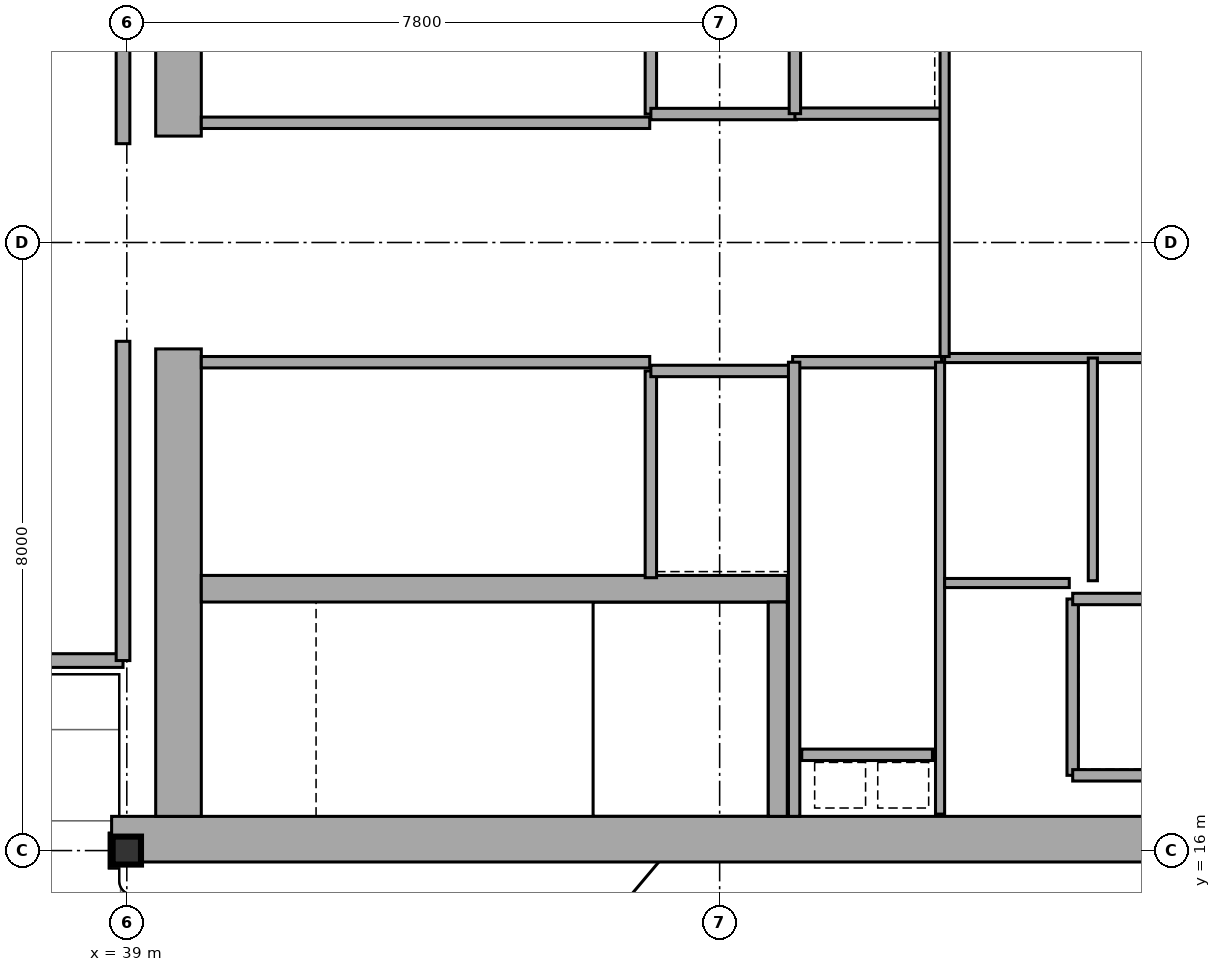
"""IFC4 building model, lengths in metres.
Left out: names, types, materials, properties, quantities, classifications, styles, units other than length and angle.
Written with IfcOpenShell. Run it as: python <this file> out.ifc"""

import sys

from ifc_helpers import new_model, si_unit, direction, frame, frame_2d, origin, origin_2d, place, context, subcontext, project, spatial, rectangle, i_section, extrude, element, fill, save


model = new_model("IFC4")
c1 = context("Model", 3, precision=1e-05, world=origin(), true_north=direction((0.0, 1.0)))
c2 = subcontext(c1, "Body", "Model", "MODEL_VIEW")
j1 = project(units=[si_unit("LENGTHUNIT", "METRE"), si_unit("PLANEANGLEUNIT", "RADIAN")], contexts=[c1])
p1 = place(None, origin())
s1 = spatial("IfcSite", under=j1, at=p1, CompositionType="ELEMENT")
p2 = place(p1, origin())
s2 = spatial("IfcBuilding", under=s1, at=p2, CompositionType="ELEMENT")
p3 = place(p2, frame((0.0, 0.0, 262.05)))
s3 = spatial("IfcBuildingStorey", under=s2, at=p3, CompositionType="ELEMENT", Elevation=262.05)
p4 = place(p3, frame((38.8, 16.15, 0.0), z_axis=(0.0, 0.0, 1.0), x_axis=(1.0, 0.0, 0.0)))
e1 = element("IfcWall", 1, at=p4, inside=s3, PredefinedType="SHEAR", context=c2, shape_type="SweptSolid", body=[
    extrude(rectangle(XDim=16.0, YDim=0.6, at=frame_2d((8.0, 0.0))), origin(), (0.0, 0.0, 1.0), 4.56),
])
for number, where, z_axis, x_axis in (
    (2, (39.68, 16.45, 0.0), (0.0, 0.0, 1.0), (0.0, 1.0, 0.0)),
    (3, (39.68, 25.4, 0.0), (0.0, 0.0, 1.0), (0.0, 1.0, 0.0)),
):
    element("IfcWall", number, at=place(p3, frame(where, z_axis=z_axis, x_axis=x_axis)), inside=s3, PredefinedType="SHEAR", context=c2, shape_type="SweptSolid", body=[
        extrude(rectangle(XDim=6.15, YDim=0.6, at=frame_2d((3.075, 0.0))), origin(), (0.0, 0.0, 1.0), 4.56),
    ])
p5 = place(p3, frame((39.98, 19.445, 0.0), z_axis=(0.0, 0.0, 1.0), x_axis=(1.0, 0.0, 0.0)))
e4 = element("IfcWall", 4, at=p5, inside=s3, PredefinedType="SHEAR", context=c2, shape_type="SweptSolid", body=[
    extrude(rectangle(XDim=7.71, YDim=0.35, at=frame_2d((3.855, 0.0))), origin(), (0.0, 0.0, 1.0), 4.56),
])
p6 = place(p5, frame((0.25, 0.0, 0.0)))
e5 = element("IfcOpeningElement", 5, at=p6, cuts=e4, PredefinedType="OPENING", context=c2, shape_type="SweptSolid", body=[
    extrude(rectangle(XDim=1.1, YDim=2.15, at=frame_2d((0.55, 1.075))), frame((0.0, 0.185, 0.0), z_axis=(0.0, -1.0, 0.0), x_axis=(1.0, 0.0, 0.0)), (0.0, 0.0, 1.0), 0.37),
])
p7 = place(p3, frame((47.565, 16.45, 0.0), z_axis=(0.0, 0.0, 1.0), x_axis=(0.0, 1.0, 0.0)))
e6 = element("IfcWall", 6, at=p7, inside=s3, PredefinedType="SHEAR", context=c2, shape_type="SweptSolid", body=[
    extrude(rectangle(XDim=2.82, YDim=0.25, at=frame_2d((1.41, 0.0))), origin(), (0.0, 0.0, 1.0), 4.56),
])
p8 = place(p3, frame((39.0, 16.0, 0.0), z_axis=(0.0, 0.0, 1.0), x_axis=(1.0, 0.0, 0.0)))
e7 = element("IfcColumn", 7, at=p8, inside=s3, PredefinedType="COLUMN", context=c2, shape_type="SweptSolid", body=[
    extrude(i_section(OverallWidth=0.373, OverallDepth=0.368, WebThickness=0.015, FlangeThickness=0.024, at=origin_2d()), origin(), (0.0, 0.0, 1.0), 4.794),
])
p9 = place(p3, frame((39.98, 25.575, 0.0), z_axis=(0.0, 0.0, 1.0), x_axis=(1.0, 0.0, 0.0)))
e8 = element("IfcWall", 8, at=p9, inside=s3, PredefinedType="PARTITIONING", context=c2, shape_type="SweptSolid", body=[
    extrude(rectangle(XDim=5.9, YDim=0.15, at=frame_2d((2.95, 0.0))), origin(), (0.0, 0.0, 1.0), 4.56),
])
p10 = place(p9, frame((2.35, 0.0, 0.0)))
e9 = element("IfcOpeningElement", 9, at=p10, cuts=e8, PredefinedType="OPENING", context=c2, shape_type="SweptSolid", body=[
    extrude(rectangle(XDim=1.05, YDim=2.15, at=frame_2d((0.525, 1.075))), frame((0.0, 0.085, 0.0), z_axis=(0.0, -1.0, 0.0), x_axis=(1.0, 0.0, 0.0)), (0.0, 0.0, 1.0), 0.17),
])
p11 = place(p3, frame((39.98, 22.425, 0.0), z_axis=(0.0, 0.0, 1.0), x_axis=(1.0, 0.0, 0.0)))
e10 = element("IfcWall", 10, at=p11, inside=s3, PredefinedType="PARTITIONING", context=c2, shape_type="SweptSolid", body=[
    extrude(rectangle(XDim=5.9, YDim=0.15, at=frame_2d((2.95, 0.0))), origin(), (0.0, 0.0, 1.0), 4.56),
])
p12 = place(p11, frame((2.35, 0.0, 0.0)))
e11 = element("IfcOpeningElement", 11, at=p12, cuts=e10, PredefinedType="OPENING", context=c2, shape_type="SweptSolid", body=[
    extrude(rectangle(XDim=1.05, YDim=2.15, at=frame_2d((0.525, 1.075))), frame((0.0, 0.085, 0.0), z_axis=(0.0, -1.0, 0.0), x_axis=(1.0, 0.0, 0.0)), (0.0, 0.0, 1.0), 0.17),
])
p13 = place(p3, frame((45.895, 25.69, 0.0), z_axis=(0.0, 0.0, 1.0), x_axis=(0.0, 1.0, 0.0)))
e12 = element("IfcWall", 12, at=p13, inside=s3, PredefinedType="PARTITIONING", context=c2, shape_type="SweptSolid", body=[
    extrude(rectangle(XDim=2.72, YDim=0.15, at=frame_2d((1.36, 0.0))), origin(), (0.0, 0.0, 1.0), 4.56),
])
p14 = place(p13, frame((0.81, 0.0, 0.0)))
e13 = element("IfcOpeningElement", 13, at=p14, cuts=e12, PredefinedType="OPENING", context=c2, shape_type="SweptSolid", body=[
    extrude(rectangle(XDim=1.1, YDim=2.15, at=frame_2d((0.55, 1.075))), frame((0.0, 0.085, 0.0), z_axis=(0.0, -1.0, 0.0), x_axis=(1.0, 0.0, 0.0)), (0.0, 0.0, 1.0), 0.17),
])
p15 = place(p3, frame((45.895, 25.69, 0.0), z_axis=(0.0, 0.0, 1.0), x_axis=(1.0, 0.0, 0.0)))
e14 = element("IfcWall", 14, at=p15, inside=s3, PredefinedType="PARTITIONING", context=c2, shape_type="SweptSolid", body=[
    extrude(rectangle(XDim=1.915, YDim=0.15, at=frame_2d((0.958, 0.0))), origin(), (0.0, 0.0, 1.0), 4.56),
])
p16 = place(p3, frame((45.895, 19.59, 0.0), z_axis=(0.0, 0.0, 1.0), x_axis=(0.0, 1.0, 0.0)))
e15 = element("IfcWall", 15, at=p16, inside=s3, PredefinedType="PARTITIONING", context=c2, shape_type="SweptSolid", body=[
    extrude(rectangle(XDim=2.72, YDim=0.15, at=frame_2d((1.36, 0.0))), origin(), (0.0, 0.0, 1.0), 4.56),
])
p17 = place(p16, frame((0.81, 0.0, 0.0)))
e16 = element("IfcOpeningElement", 16, at=p17, cuts=e15, PredefinedType="OPENING", context=c2, shape_type="SweptSolid", body=[
    extrude(rectangle(XDim=1.1, YDim=2.15, at=frame_2d((0.55, 1.075))), frame((0.0, 0.085, 0.0), z_axis=(0.0, -1.0, 0.0), x_axis=(1.0, 0.0, 0.0)), (0.0, 0.0, 1.0), 0.17),
])
p18 = place(p3, frame((45.895, 22.31, 0.0), z_axis=(0.0, 0.0, 1.0), x_axis=(1.0, 0.0, 0.0)))
e17 = element("IfcWall", 17, at=p18, inside=s3, PredefinedType="PARTITIONING", context=c2, shape_type="SweptSolid", body=[
    extrude(rectangle(XDim=1.915, YDim=0.15, at=frame_2d((0.958, 0.0))), origin(), (0.0, 0.0, 1.0), 4.56),
])
p19 = place(p3, frame((47.79, 25.695, 0.0), z_axis=(0.0, 0.0, 1.0), x_axis=(1.0, 0.0, 0.0)))
e18 = element("IfcWall", 18, at=p19, inside=s3, PredefinedType="PARTITIONING", context=c2, shape_type="SweptSolid", body=[
    extrude(rectangle(XDim=1.92, YDim=0.15, at=frame_2d((0.96, 0.0))), origin(), (0.0, 0.0, 1.0), 4.56),
])
p20 = place(p19, frame((0.41, 0.0, 0.0)))
e19 = element("IfcOpeningElement", 19, at=p20, cuts=e18, PredefinedType="OPENING", context=c2, shape_type="SweptSolid", body=[
    extrude(rectangle(XDim=1.1, YDim=2.15, at=frame_2d((0.55, 1.075))), frame((0.0, 0.085, 0.0), z_axis=(0.0, -1.0, 0.0), x_axis=(1.0, 0.0, 0.0)), (0.0, 0.0, 1.0), 0.17),
])
p21 = place(p3, frame((47.79, 25.695, 0.0), z_axis=(0.0, 0.0, 1.0), x_axis=(0.0, 1.0, 0.0)))
e20 = element("IfcWall", 20, at=p21, inside=s3, PredefinedType="PARTITIONING", context=c2, shape_type="SweptSolid", body=[
    extrude(rectangle(XDim=2.415, YDim=0.15, at=frame_2d((1.208, 0.0))), origin(), (0.0, 0.0, 1.0), 4.56),
])
p22 = place(p3, frame((51.445, 16.99, 0.0), z_axis=(0.0, 0.0, 1.0), x_axis=(0.0, 1.0, 0.0)))
e21 = element("IfcWall", 21, at=p22, inside=s3, PredefinedType="PARTITIONING", context=c2, shape_type="SweptSolid", body=[
    extrude(rectangle(XDim=2.32, YDim=0.15, at=frame_2d((1.16, 0.0))), origin(), (0.0, 0.0, 1.0), 4.56),
])
p23 = place(p22, frame((0.61, 0.0, 0.0)))
e22 = element("IfcOpeningElement", 22, at=p23, cuts=e21, PredefinedType="OPENING", context=c2, shape_type="SweptSolid", body=[
    extrude(rectangle(XDim=1.1, YDim=2.15, at=frame_2d((0.55, 1.075))), frame((0.0, 0.085, 0.0), z_axis=(0.0, -1.0, 0.0), x_axis=(1.0, 0.0, 0.0)), (0.0, 0.0, 1.0), 0.17),
])
for number, where, z_axis, x_axis in (
    (23, (51.445, 16.99, 0.0), (0.0, 0.0, 1.0), (1.0, 0.0, 0.0)),
    (24, (51.445, 19.31, 0.0), (0.0, 0.0, 1.0), (1.0, 0.0, 0.0)),
):
    element("IfcWall", number, at=place(p3, frame(where, z_axis=z_axis, x_axis=x_axis)), inside=s3, PredefinedType="PARTITIONING", context=c2, shape_type="SweptSolid", body=[
        extrude(rectangle(XDim=2.015, YDim=0.15, at=frame_2d((1.007, 0.0))), origin(), (0.0, 0.0, 1.0), 4.56),
    ])
p24 = place(p3, frame((47.88, 17.26, 0.0), z_axis=(0.0, 0.0, 1.0), x_axis=(1.0, 0.0, 0.0)))
e25 = element("IfcWall", 25, at=p24, inside=s3, PredefinedType="PARTITIONING", context=c2, shape_type="SweptSolid", body=[
    extrude(rectangle(XDim=1.72, YDim=0.15, at=frame_2d((0.86, 0.0))), origin(), (0.0, 0.0, 1.0), 4.56),
])
p25 = place(p24, frame((0.42, 0.0, 0.0)))
e26 = element("IfcOpeningElement", 26, at=p25, cuts=e25, PredefinedType="OPENING", context=c2, shape_type="SweptSolid", body=[
    extrude(rectangle(XDim=0.85, YDim=2.15, at=frame_2d((0.425, 1.075))), frame((0.0, 0.085, 0.0), z_axis=(0.0, -1.0, 0.0), x_axis=(1.0, 0.0, 0.0)), (0.0, 0.0, 1.0), 0.17),
])
p26 = place(p3, frame((47.76, 22.425, 0.0), z_axis=(0.0, 0.0, 1.0), x_axis=(1.0, 0.0, 0.0)))
e27 = element("IfcWall", 27, at=p26, inside=s3, PredefinedType="PARTITIONING", context=c2, shape_type="SweptSolid", body=[
    extrude(rectangle(XDim=1.96, YDim=0.15, at=frame_2d((0.98, 0.0))), origin(), (0.0, 0.0, 1.0), 4.56),
])
p27 = place(p3, frame((47.78, 16.45, 0.0), z_axis=(0.0, 0.0, 1.0), x_axis=(0.0, 1.0, 0.0)))
e28 = element("IfcWall", 28, at=p27, inside=s3, PredefinedType="PARTITIONING", context=c2, shape_type="SweptSolid", body=[
    extrude(rectangle(XDim=5.975, YDim=0.15, at=frame_2d((2.988, 0.0))), origin(), (0.0, 0.0, 1.0), 4.56),
])
p28 = place(p3, frame((49.7, 16.48, 0.0), z_axis=(0.0, 0.0, 1.0), x_axis=(0.0, 1.0, 0.0)))
e29 = element("IfcWall", 29, at=p28, inside=s3, PredefinedType="PARTITIONING", context=c2, shape_type="SweptSolid", body=[
    extrude(rectangle(XDim=5.945, YDim=0.12, at=frame_2d((2.973, 0.0))), origin(), (0.0, 0.0, 1.0), 4.56),
])
p29 = place(p28, frame((3.35, 0.0, 0.0)))
e30 = element("IfcOpeningElement", 30, at=p29, cuts=e29, PredefinedType="OPENING", context=c2, shape_type="SweptSolid", body=[
    extrude(rectangle(XDim=0.95, YDim=2.15, at=frame_2d((0.475, 1.075))), frame((0.0, 0.07, 0.0), z_axis=(0.0, -1.0, 0.0), x_axis=(1.0, 0.0, 0.0)), (0.0, 0.0, 1.0), 0.14),
])
p30 = place(p3, frame((49.76, 22.48, 0.0), z_axis=(0.0, 0.0, 1.0), x_axis=(1.0, 0.0, 0.0)))
e31 = element("IfcWall", 31, at=p30, inside=s3, PredefinedType="PARTITIONING", context=c2, shape_type="SweptSolid", body=[
    extrude(rectangle(XDim=3.9, YDim=0.12, at=frame_2d((1.95, 0.0))), origin(), (0.0, 0.0, 1.0), 4.56),
])
p31 = place(p30, frame((0.42, 0.0, 0.0)))
e32 = element("IfcOpeningElement", 32, at=p31, cuts=e31, PredefinedType="OPENING", context=c2, shape_type="SweptSolid", body=[
    extrude(rectangle(XDim=0.85, YDim=2.15, at=frame_2d((0.425, 1.075))), frame((0.0, 0.07, 0.0), z_axis=(0.0, -1.0, 0.0), x_axis=(1.0, 0.0, 0.0)), (0.0, 0.0, 1.0), 0.14),
])
p32 = place(p3, frame((51.71, 19.55, 0.0), z_axis=(0.0, 0.0, 1.0), x_axis=(0.0, 1.0, 0.0)))
e33 = element("IfcWall", 33, at=p32, inside=s3, PredefinedType="PARTITIONING", context=c2, shape_type="SweptSolid", body=[
    extrude(rectangle(XDim=2.93, YDim=0.12, at=frame_2d((1.465, 0.0))), origin(), (0.0, 0.0, 1.0), 4.56),
])
p33 = place(p32, frame((0.95, 0.0, 0.0)))
e34 = element("IfcOpeningElement", 34, at=p33, cuts=e33, PredefinedType="OPENING", context=c2, shape_type="SweptSolid", body=[
    extrude(rectangle(XDim=0.85, YDim=2.15, at=frame_2d((0.425, 1.075))), frame((0.0, 0.07, 0.0), z_axis=(0.0, -1.0, 0.0), x_axis=(1.0, 0.0, 0.0)), (0.0, 0.0, 1.0), 0.14),
])
p34 = place(p3, frame((49.76, 19.52, 0.0), z_axis=(0.0, 0.0, 1.0), x_axis=(1.0, 0.0, 0.0)))
e35 = element("IfcWall", 35, at=p34, inside=s3, PredefinedType="PARTITIONING", context=c2, shape_type="SweptSolid", body=[
    extrude(rectangle(XDim=1.64, YDim=0.12, at=frame_2d((0.82, 0.0))), origin(), (0.0, 0.0, 1.0), 4.56),
])
p35 = place(p3, frame((49.76, 22.5, 0.0), z_axis=(0.0, 0.0, 1.0), x_axis=(0.0, 1.0, 0.0)))
e36 = element("IfcWall", 36, at=p35, inside=s3, PredefinedType="PARTITIONING", context=c2, shape_type="SweptSolid", body=[
    extrude(rectangle(XDim=5.72, YDim=0.12, at=frame_2d((2.86, 0.0))), origin(), (0.0, 0.0, 1.0), 4.56),
])
p36 = place(p35, frame((0.95, 0.0, 0.0)))
e37 = element("IfcOpeningElement", 37, at=p36, cuts=e36, PredefinedType="OPENING", context=c2, shape_type="SweptSolid", body=[
    extrude(rectangle(XDim=0.95, YDim=2.15, at=frame_2d((0.475, 1.075))), frame((0.0, 0.07, 0.0), z_axis=(0.0, -1.0, 0.0), x_axis=(1.0, 0.0, 0.0)), (0.0, 0.0, 1.0), 0.14),
])
p37 = place(p3, frame((27.204, 18.5, 0.0), z_axis=(0.0, 0.0, 1.0), x_axis=(1.0, 0.0, 0.0)))
e38 = element("IfcWall", 38, at=p37, inside=s3, PredefinedType="SOLIDWALL", context=c2, shape_type="SweptSolid", body=[
    extrude(rectangle(XDim=11.746, YDim=0.18, at=frame_2d((5.873, 0.0))), origin(), (0.0, 0.0, 1.0), 4.02),
])
p38 = place(p37, frame((5.373, 0.0, 0.0)))
e39 = element("IfcOpeningElement", 39, at=p38, cuts=e38, PredefinedType="OPENING", context=c2, shape_type="SweptSolid", body=[
    extrude(rectangle(XDim=1.0, YDim=2.15, at=frame_2d((0.5, 1.075))), frame((0.0, 0.1, 0.0), z_axis=(0.0, -1.0, 0.0), x_axis=(1.0, 0.0, 0.0)), (0.0, 0.0, 1.0), 0.2),
])
for number, where, z_axis, x_axis in (
    (40, (38.95, 18.5, 0.0), (0.0, 0.0, 1.0), (0.0, 1.0, 0.0)),
    (41, (38.95, 25.3, 0.0), (0.0, 0.0, 1.0), (0.0, 1.0, 0.0)),
):
    element("IfcWall", number, at=place(p3, frame(where, z_axis=z_axis, x_axis=x_axis)), inside=s3, PredefinedType="SOLIDWALL", context=c2, shape_type="SweptSolid", body=[
        extrude(rectangle(XDim=4.2, YDim=0.18, at=frame_2d((2.1, 0.0))), origin(), (0.0, 0.0, 1.0), 4.29),
    ])
p39 = place(p10, origin())
e42 = element("IfcDoor", 42, at=p39, inside=s3, OperationType="SINGLE_SWING_LEFT", PredefinedType="DOOR", context=c2, shape_type="SweptSolid", body=[
    extrude(rectangle(XDim=1.05, YDim=2.15, at=frame_2d((0.525, 1.075))), frame((0.0, 0.025, 0.0), z_axis=(0.0, -1.0, 0.0), x_axis=(1.0, 0.0, 0.0)), (0.0, 0.0, 1.0), 0.05),
])
fill(e9, e42)
p40 = place(p12, frame((1.05, 0.0, 0.0), z_axis=(0.0, 0.0, 1.0), x_axis=(-1.0, 0.0, 0.0)))
e43 = element("IfcDoor", 43, at=p40, inside=s3, OperationType="SINGLE_SWING_RIGHT", PredefinedType="DOOR", context=c2, shape_type="SweptSolid", body=[
    extrude(rectangle(XDim=1.05, YDim=2.15, at=frame_2d((0.525, 1.075))), frame((0.0, 0.025, 0.0), z_axis=(0.0, -1.0, 0.0), x_axis=(1.0, 0.0, 0.0)), (0.0, 0.0, 1.0), 0.05),
])
fill(e11, e43)
p41 = place(p17, frame((1.1, 0.0, 0.0), z_axis=(0.0, 0.0, 1.0), x_axis=(-1.0, 0.0, 0.0)))
e44 = element("IfcDoor", 44, at=p41, inside=s3, OperationType="DOUBLE_DOOR_SLIDING", PredefinedType="DOOR", context=c2, shape_type="SweptSolid", body=[
    extrude(rectangle(XDim=1.1, YDim=2.15, at=frame_2d((0.55, 1.075))), frame((0.0, 0.025, 0.0), z_axis=(0.0, -1.0, 0.0), x_axis=(1.0, 0.0, 0.0)), (0.0, 0.0, 1.0), 0.05),
])
fill(e16, e44)
p42 = place(p20, frame((1.1, 0.0, 0.0), z_axis=(0.0, 0.0, 1.0), x_axis=(-1.0, 0.0, 0.0)))
e45 = element("IfcDoor", 45, at=p42, inside=s3, OperationType="DOUBLE_DOOR_SLIDING", PredefinedType="DOOR", context=c2, shape_type="SweptSolid", body=[
    extrude(rectangle(XDim=1.1, YDim=2.15, at=frame_2d((0.55, 1.075))), frame((0.0, 0.025, 0.0), z_axis=(0.0, -1.0, 0.0), x_axis=(1.0, 0.0, 0.0)), (0.0, 0.0, 1.0), 0.05),
])
fill(e19, e45)
p43 = place(p23, frame((1.1, 0.0, 0.0), z_axis=(0.0, 0.0, 1.0), x_axis=(-1.0, 0.0, 0.0)))
e46 = element("IfcDoor", 46, at=p43, inside=s3, OperationType="DOUBLE_DOOR_SLIDING", PredefinedType="DOOR", context=c2, shape_type="SweptSolid", body=[
    extrude(rectangle(XDim=1.1, YDim=2.15, at=frame_2d((0.55, 1.075))), frame((0.0, 0.025, 0.0), z_axis=(0.0, -1.0, 0.0), x_axis=(1.0, 0.0, 0.0)), (0.0, 0.0, 1.0), 0.05),
])
fill(e22, e46)
p44 = place(p25, origin())
e47 = element("IfcDoor", 47, at=p44, inside=s3, OperationType="SINGLE_SWING_LEFT", PredefinedType="TRAPDOOR", context=c2, shape_type="SweptSolid", body=[
    extrude(rectangle(XDim=0.85, YDim=2.15, at=frame_2d((0.425, 1.075))), frame((0.0, 0.025, 0.0), z_axis=(0.0, -1.0, 0.0), x_axis=(1.0, 0.0, 0.0)), (0.0, 0.0, 1.0), 0.05),
])
fill(e26, e47)
p45 = place(p29, frame((0.95, 0.0, 0.0), z_axis=(0.0, 0.0, 1.0), x_axis=(-1.0, 0.0, 0.0)))
e48 = element("IfcDoor", 48, at=p45, inside=s3, OperationType="SINGLE_SWING_LEFT", PredefinedType="DOOR", context=c2, shape_type="SweptSolid", body=[
    extrude(rectangle(XDim=0.95, YDim=2.15, at=frame_2d((0.475, 1.075))), frame((0.0, 0.025, 0.0), z_axis=(0.0, -1.0, 0.0), x_axis=(1.0, 0.0, 0.0)), (0.0, 0.0, 1.0), 0.05),
])
fill(e30, e48)
p46 = place(p31, frame((0.85, 0.0, 0.0), z_axis=(0.0, 0.0, 1.0), x_axis=(-1.0, 0.0, 0.0)))
e49 = element("IfcDoor", 49, at=p46, inside=s3, OperationType="SINGLE_SWING_LEFT", PredefinedType="DOOR", context=c2, shape_type="SweptSolid", body=[
    extrude(rectangle(XDim=0.85, YDim=2.15, at=frame_2d((0.425, 1.075))), frame((0.0, 0.025, 0.0), z_axis=(0.0, -1.0, 0.0), x_axis=(1.0, 0.0, 0.0)), (0.0, 0.0, 1.0), 0.05),
])
fill(e32, e49)
p47 = place(p33, origin())
e50 = element("IfcDoor", 50, at=p47, inside=s3, OperationType="SINGLE_SWING_RIGHT", PredefinedType="DOOR", context=c2, shape_type="SweptSolid", body=[
    extrude(rectangle(XDim=0.85, YDim=2.15, at=frame_2d((0.425, 1.075))), frame((0.0, 0.025, 0.0), z_axis=(0.0, -1.0, 0.0), x_axis=(1.0, 0.0, 0.0)), (0.0, 0.0, 1.0), 0.05),
])
fill(e34, e50)
p48 = place(p36, origin())
e51 = element("IfcDoor", 51, at=p48, inside=s3, OperationType="SINGLE_SWING_LEFT", PredefinedType="DOOR", context=c2, shape_type="SweptSolid", body=[
    extrude(rectangle(XDim=0.95, YDim=2.15, at=frame_2d((0.475, 1.075))), frame((0.0, 0.025, 0.0), z_axis=(0.0, -1.0, 0.0), x_axis=(1.0, 0.0, 0.0)), (0.0, 0.0, 1.0), 0.05),
])
fill(e37, e51)
p49 = place(p6, frame((1.1, 0.0, 0.0), z_axis=(0.0, 0.0, 1.0), x_axis=(-1.0, 0.0, 0.0)))
e52 = element("IfcDoor", 52, at=p49, inside=s3, OperationType="SINGLE_SWING_LEFT", PredefinedType="DOOR", context=c2, shape_type="SweptSolid", body=[
    extrude(rectangle(XDim=1.1, YDim=2.15, at=frame_2d((0.55, 1.075))), frame((0.0, 0.025, 0.0), z_axis=(0.0, -1.0, 0.0), x_axis=(1.0, 0.0, 0.0)), (0.0, 0.0, 1.0), 0.05),
])
fill(e5, e52)
save(model, sys.argv[1])
